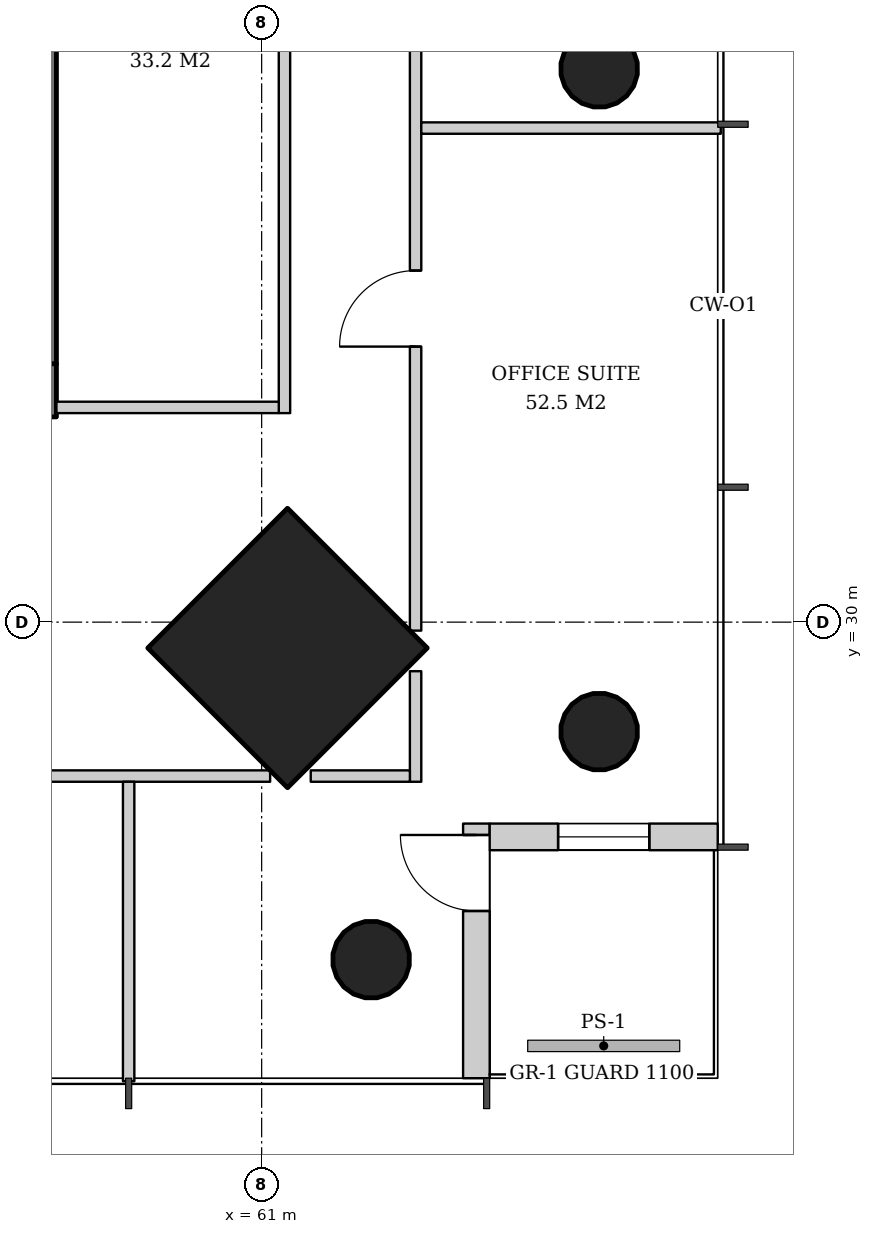
"""IFC4 building model, lengths in metres.
Left out: names, types, materials, properties, quantities, classifications, styles, units other than length and angle.
Written with IfcOpenShell. Run it as: python <this file> out.ifc"""

import sys

from ifc_helpers import new_model, si_unit, direction, frame, frame_2d, origin, origin_2d, place, context, subcontext, project, spatial, rectangle, hollow_circle, extrude, element, fill, save


model = new_model("IFC4")
c1 = context("Model", 3, precision=1e-05, world=origin(), true_north=direction((0.0, 1.0)))
c2 = subcontext(c1, "Body", "Model", "MODEL_VIEW")
j1 = project(units=[si_unit("LENGTHUNIT", "METRE"), si_unit("PLANEANGLEUNIT", "RADIAN")], contexts=[c1])
p1 = place(None, origin())
s1 = spatial("IfcSite", under=j1, at=p1, CompositionType="ELEMENT")
p2 = place(p1, origin())
s2 = spatial("IfcBuilding", under=s1, at=p2, CompositionType="ELEMENT")
p3 = place(p2, frame((0.0, 0.0, 131.2)))
s3 = spatial("IfcBuildingStorey", under=s2, at=p3, CompositionType="ELEMENT", Elevation=131.2)
p4 = place(p3, frame((65.479, 28.521, 0.0), z_axis=(-0.031898107953, 0.031898107953, 0.998981992539), x_axis=(-0.707106781187, -0.707106781187, 0.0)))
e1 = element("IfcColumn", 1, at=p4, inside=s3, PredefinedType="COLUMN", context=c2, shape_type="SweptSolid", body=[
    extrude(hollow_circle(Radius=0.508, WallThickness=0.04, at=origin_2d()), origin(), (0.0, 0.0, 1.0), 3.804),
])
p5 = place(p3, frame((65.479, 37.261, 0.0), z_axis=(-0.031910269556, 0.015987237665, 0.999362868496), x_axis=(-0.447933021895, -0.894067115991, 0.0)))
e2 = element("IfcColumn", 2, at=p5, inside=s3, PredefinedType="COLUMN", context=c2, shape_type="SweptSolid", body=[
    extrude(hollow_circle(Radius=0.508, WallThickness=0.04, at=origin_2d()), origin(), (0.0, 0.0, 1.0), 3.802),
])
p6 = place(p3, frame((61.379, 29.621, 0.0), z_axis=(-0.031962158256, 0.031962158256, 0.998977898093), x_axis=(-0.707106781187, -0.707106781187, 0.0)))
e3 = element("IfcColumn", 3, at=p6, inside=s3, PredefinedType="COLUMN", context=c2, shape_type="SweptSolid", body=[
    extrude(rectangle(XDim=2.6, YDim=2.6, at=origin_2d()), origin(), (0.0, 0.0, 1.0), 3.804),
])
p7 = place(p3, frame((62.479, 25.521, 0.0), z_axis=(-0.031898107953, 0.031898107953, 0.998981992539), x_axis=(-0.707106781187, -0.707106781187, 0.0)))
e4 = element("IfcColumn", 4, at=p7, inside=s3, PredefinedType="COLUMN", context=c2, shape_type="SweptSolid", body=[
    extrude(hollow_circle(Radius=0.508, WallThickness=0.04, at=origin_2d()), origin(), (0.0, 0.0, 1.0), 3.804),
])
p8 = place(p3, frame((31.7, 33.05, 0.0), z_axis=(0.0, 0.0, 1.0), x_axis=(1.0, 0.0, 0.0)))
e5 = element("IfcWall", 5, at=p8, inside=s3, PredefinedType="SHEAR", context=c2, shape_type="SweptSolid", body=[
    extrude(rectangle(XDim=26.6, YDim=0.7, at=frame_2d((13.3, 0.0))), origin(), (0.0, 0.0, 1.0), 3.8),
])
p9 = place(p8, frame((7.3, 0.0, 0.0)))
e6 = element("IfcOpeningElement", 6, at=p9, cuts=e5, PredefinedType="OPENING", context=c2, shape_type="SweptSolid", body=[
    extrude(rectangle(XDim=1.0, YDim=2.1, at=frame_2d((0.5, 1.05))), frame((0.0, 0.36, 0.0), z_axis=(0.0, -1.0, 0.0), x_axis=(1.0, 0.0, 0.0)), (0.0, 0.0, 1.0), 0.72),
])
p10 = place(p8, frame((18.75, 0.0, 0.0)))
e7 = element("IfcOpeningElement", 7, at=p10, cuts=e5, PredefinedType="OPENING", context=c2, shape_type="SweptSolid", body=[
    extrude(rectangle(XDim=1.0, YDim=2.1, at=frame_2d((0.5, 1.05))), frame((0.0, 0.36, 0.0), z_axis=(0.0, -1.0, 0.0), x_axis=(1.0, 0.0, 0.0)), (0.0, 0.0, 1.0), 0.72),
])
p11 = place(p8, frame((3.2, 0.0, 0.0)))
e8 = element("IfcOpeningElement", 8, at=p11, cuts=e5, PredefinedType="OPENING", context=c2, shape_type="SweptSolid", body=[
    extrude(rectangle(XDim=1.0, YDim=2.1, at=frame_2d((0.5, 1.05))), frame((0.0, 0.36, 0.0), z_axis=(0.0, -1.0, 0.0), x_axis=(1.0, 0.0, 0.0)), (0.0, 0.0, 1.0), 0.72),
])
p12 = place(p8, frame((10.42, 0.0, 0.0)))
e9 = element("IfcOpeningElement", 9, at=p12, cuts=e5, PredefinedType="OPENING", context=c2, shape_type="SweptSolid", body=[
    extrude(rectangle(XDim=1.0, YDim=2.1, at=frame_2d((0.5, 1.05))), frame((0.0, 0.36, 0.0), z_axis=(0.0, -1.0, 0.0), x_axis=(1.0, 0.0, 0.0)), (0.0, 0.0, 1.0), 0.72),
])
p13 = place(p8, frame((14.46, 0.0, 0.0)))
e10 = element("IfcOpeningElement", 10, at=p13, cuts=e5, PredefinedType="OPENING", context=c2, shape_type="SweptSolid", body=[
    extrude(rectangle(XDim=1.0, YDim=2.1, at=frame_2d((0.5, 1.05))), frame((0.0, 0.36, 0.0), z_axis=(0.0, -1.0, 0.0), x_axis=(1.0, 0.0, 0.0)), (0.0, 0.0, 1.0), 0.72),
])
p14 = place(p8, frame((22.5, 0.0, 0.0)))
e11 = element("IfcOpeningElement", 11, at=p14, cuts=e5, PredefinedType="OPENING", context=c2, shape_type="SweptSolid", body=[
    extrude(rectangle(XDim=1.0, YDim=2.1, at=frame_2d((0.5, 1.05))), frame((0.0, 0.36, 0.0), z_axis=(0.0, -1.0, 0.0), x_axis=(1.0, 0.0, 0.0)), (0.0, 0.0, 1.0), 0.72),
])
p15 = place(p3, frame((57.95, 33.4, 0.0), z_axis=(0.0, 0.0, 1.0), x_axis=(0.0, 1.0, 0.0)))
e12 = element("IfcWall", 12, at=p15, inside=s3, PredefinedType="SHEAR", context=c2, shape_type="SweptSolid", body=[
    extrude(rectangle(XDim=25.2, YDim=0.7, at=frame_2d((12.6, 0.0))), origin(), (0.0, 0.0, 1.0), 3.8),
])
p16 = place(p15, frame((11.7, 0.0, 0.0)))
e13 = element("IfcOpeningElement", 13, at=p16, cuts=e12, PredefinedType="OPENING", context=c2, shape_type="SweptSolid", body=[
    extrude(rectangle(XDim=1.8, YDim=2.4, at=frame_2d((0.9, 1.2))), frame((0.0, 0.36, 0.0), z_axis=(0.0, -1.0, 0.0), x_axis=(1.0, 0.0, 0.0)), (0.0, 0.0, 1.0), 0.72),
])
p17 = place(p3, frame((63.825, 24.0, 0.0), z_axis=(0.0, 0.0, 1.0), x_axis=(0.0, 1.0, 0.0)))
e14 = element("IfcWall", 14, at=p17, inside=s3, PredefinedType="SOLIDWALL", context=c2, shape_type="SweptSolid", body=[
    extrude(rectangle(XDim=3.35, YDim=0.35, at=frame_2d((1.675, 0.0))), origin(), (0.0, 0.0, 1.0), 3.62),
])
p18 = place(p17, frame((2.2, 0.0, 0.0)))
e15 = element("IfcOpeningElement", 15, at=p18, cuts=e14, PredefinedType="OPENING", context=c2, shape_type="SweptSolid", body=[
    extrude(rectangle(XDim=1.0, YDim=2.4, at=frame_2d((0.5, 1.2))), frame((0.0, 0.185, 0.0), z_axis=(0.0, -1.0, 0.0), x_axis=(1.0, 0.0, 0.0)), (0.0, 0.0, 1.0), 0.37),
])
p19 = place(p3, frame((64.0, 27.175, 0.0), z_axis=(0.0, 0.0, 1.0), x_axis=(1.0, 0.0, 0.0)))
e16 = element("IfcWall", 16, at=p19, inside=s3, PredefinedType="SOLIDWALL", context=c2, shape_type="SweptSolid", body=[
    extrude(rectangle(XDim=3.0, YDim=0.35, at=frame_2d((1.5, 0.0))), origin(), (0.0, 0.0, 1.0), 3.62),
])
p20 = place(p19, frame((0.9, 0.0, 0.6)))
e17 = element("IfcOpeningElement", 17, at=p20, cuts=e16, PredefinedType="OPENING", context=c2, shape_type="SweptSolid", body=[
    extrude(rectangle(XDim=1.2, YDim=2.55, at=frame_2d((0.6, 1.275))), frame((0.0, 0.185, 0.0), z_axis=(0.0, -1.0, 0.0), x_axis=(1.0, 0.0, 0.0)), (0.0, 0.0, 1.0), 0.37),
])
p21 = place(p3, frame((61.3, 32.75, 0.0), z_axis=(0.0, 0.0, 1.0), x_axis=(0.0, 1.0, 0.0)))
e18 = element("IfcWall", 18, at=p21, inside=s3, PredefinedType="PARTITIONING", context=c2, shape_type="SweptSolid", body=[
    extrude(rectangle(XDim=11.225, YDim=0.15, at=frame_2d((5.613, 0.0))), origin(), (0.0, 0.0, 1.0), 2.72),
])
p22 = place(p21, frame((5.113, 0.0, 0.0)))
e19 = element("IfcOpeningElement", 19, at=p22, cuts=e18, PredefinedType="OPENING", context=c2, shape_type="SweptSolid", body=[
    extrude(rectangle(XDim=1.0, YDim=2.1, at=frame_2d((0.5, 1.05))), frame((0.0, 0.085, 0.0), z_axis=(0.0, -1.0, 0.0), x_axis=(1.0, 0.0, 0.0)), (0.0, 0.0, 1.0), 0.17),
])
p23 = place(p3, frame((58.3, 32.825, 0.0), z_axis=(0.0, 0.0, 1.0), x_axis=(1.0, 0.0, 0.0)))
e20 = element("IfcWall", 20, at=p23, inside=s3, PredefinedType="PARTITIONING", context=c2, shape_type="SweptSolid", body=[
    extrude(rectangle(XDim=2.925, YDim=0.15, at=frame_2d((1.462, 0.0))), origin(), (0.0, 0.0, 1.0), 2.72),
])
p24 = place(p3, frame((63.025, 27.9, 0.0), z_axis=(0.0, 0.0, 1.0), x_axis=(0.0, 1.0, 0.0)))
e21 = element("IfcWall", 21, at=p24, inside=s3, PredefinedType="PARTITIONING", context=c2, shape_type="SweptSolid", body=[
    extrude(rectangle(XDim=1.455, YDim=0.15, at=frame_2d((0.727, 0.0))), origin(), (0.0, 0.0, 1.0), 3.07),
])
p25 = place(p3, frame((63.025, 29.888, 0.0), z_axis=(0.0, 0.0, 1.0), x_axis=(0.0, 1.0, 0.0)))
e22 = element("IfcWall", 22, at=p25, inside=s3, PredefinedType="PARTITIONING", context=c2, shape_type="SweptSolid", body=[
    extrude(rectangle(XDim=32.223, YDim=0.15, at=frame_2d((16.112, 0.0))), origin(), (0.0, 0.0, 1.0), 2.72),
])
p26 = place(p25, frame((3.737, 0.0, 0.0)))
e23 = element("IfcOpeningElement", 23, at=p26, cuts=e22, PredefinedType="OPENING", context=c2, shape_type="SweptSolid", body=[
    extrude(rectangle(XDim=1.0, YDim=2.1, at=frame_2d((0.5, 1.05))), frame((0.0, 0.085, 0.0), z_axis=(0.0, -1.0, 0.0), x_axis=(1.0, 0.0, 0.0)), (0.0, 0.0, 1.0), 0.17),
])
p27 = place(p25, frame((8.487, 0.0, 0.0)))
e24 = element("IfcOpeningElement", 24, at=p27, cuts=e22, PredefinedType="OPENING", context=c2, shape_type="SweptSolid", body=[
    extrude(rectangle(XDim=1.0, YDim=2.1, at=frame_2d((0.5, 1.05))), frame((0.0, 0.085, 0.0), z_axis=(0.0, -1.0, 0.0), x_axis=(1.0, 0.0, 0.0)), (0.0, 0.0, 1.0), 0.17),
])
p28 = place(p25, frame((14.937, 0.0, 0.0)))
e25 = element("IfcOpeningElement", 25, at=p28, cuts=e22, PredefinedType="OPENING", context=c2, shape_type="SweptSolid", body=[
    extrude(rectangle(XDim=1.8, YDim=2.4, at=frame_2d((0.9, 1.2))), frame((0.0, 0.085, 0.0), z_axis=(0.0, -1.0, 0.0), x_axis=(1.0, 0.0, 0.0)), (0.0, 0.0, 1.0), 0.17),
])
p29 = place(p25, frame((20.437, 0.0, 0.0)))
e26 = element("IfcOpeningElement", 26, at=p29, cuts=e22, PredefinedType="OPENING", context=c2, shape_type="SweptSolid", body=[
    extrude(rectangle(XDim=1.0, YDim=2.1, at=frame_2d((0.5, 1.05))), frame((0.0, 0.085, 0.0), z_axis=(0.0, -1.0, 0.0), x_axis=(1.0, 0.0, 0.0)), (0.0, 0.0, 1.0), 0.17),
])
p30 = place(p25, frame((27.487, 0.0, 0.0)))
e27 = element("IfcOpeningElement", 27, at=p30, cuts=e22, PredefinedType="OPENING", context=c2, shape_type="SweptSolid", body=[
    extrude(rectangle(XDim=1.0, YDim=2.1, at=frame_2d((0.5, 1.05))), frame((0.0, 0.085, 0.0), z_axis=(0.0, -1.0, 0.0), x_axis=(1.0, 0.0, 0.0)), (0.0, 0.0, 1.0), 0.17),
])
p31 = place(p3, frame((63.1, 36.5, 0.0), z_axis=(0.0, 0.0, 1.0), x_axis=(1.0, 0.0, 0.0)))
e28 = element("IfcWall", 28, at=p31, inside=s3, PredefinedType="PARTITIONING", context=c2, shape_type="SweptSolid", body=[
    extrude(rectangle(XDim=3.94, YDim=0.15, at=frame_2d((1.97, 0.0))), origin(), (0.0, 0.0, 1.0), 2.82),
])
p32 = place(p3, frame((28.888, 27.975, 0.0), z_axis=(0.0, 0.0, 1.0), x_axis=(1.0, 0.0, 0.0)))
e29 = element("IfcWall", 29, at=p32, inside=s3, PredefinedType="PARTITIONING", context=c2, shape_type="SweptSolid", body=[
    extrude(rectangle(XDim=32.223, YDim=0.15, at=frame_2d((16.112, 0.0))), origin(), (0.0, 0.0, 1.0), 2.72),
])
p33 = place(p32, frame((3.336, 0.0, 0.0)))
e30 = element("IfcOpeningElement", 30, at=p33, cuts=e29, PredefinedType="OPENING", context=c2, shape_type="SweptSolid", body=[
    extrude(rectangle(XDim=1.8, YDim=2.4, at=frame_2d((0.9, 1.2))), frame((0.0, 0.085, 0.0), z_axis=(0.0, -1.0, 0.0), x_axis=(1.0, 0.0, 0.0)), (0.0, 0.0, 1.0), 0.17),
])
p34 = place(p32, frame((8.086, 0.0, 0.0)))
e31 = element("IfcOpeningElement", 31, at=p34, cuts=e29, PredefinedType="OPENING", context=c2, shape_type="SweptSolid", body=[
    extrude(rectangle(XDim=1.8, YDim=2.4, at=frame_2d((0.9, 1.2))), frame((0.0, 0.085, 0.0), z_axis=(0.0, -1.0, 0.0), x_axis=(1.0, 0.0, 0.0)), (0.0, 0.0, 1.0), 0.17),
])
p35 = place(p3, frame((61.646, 27.975, 0.0), z_axis=(0.0, 0.0, 1.0), x_axis=(1.0, 0.0, 0.0)))
e32 = element("IfcWall", 32, at=p35, inside=s3, PredefinedType="PARTITIONING", context=c2, shape_type="SweptSolid", body=[
    extrude(rectangle(XDim=1.304, YDim=0.15, at=frame_2d((0.652, 0.0))), origin(), (0.0, 0.0, 1.0), 3.07),
])
p36 = place(p3, frame((59.25, 27.9, 0.0), z_axis=(0.0, 0.0, 1.0), x_axis=(0.0, -1.0, 0.0)))
e33 = element("IfcWall", 33, at=p36, inside=s3, PredefinedType="PARTITIONING", context=c2, shape_type="SweptSolid", body=[
    extrude(rectangle(XDim=3.94, YDim=0.15, at=frame_2d((1.97, 0.0))), origin(), (0.0, 0.0, 1.0), 2.82),
])
p37 = place(p18, origin())
e34 = element("IfcDoor", 34, at=p37, inside=s3, OperationType="SINGLE_SWING_RIGHT", PredefinedType="DOOR", context=c2, shape_type="SweptSolid", body=[
    extrude(rectangle(XDim=1.0, YDim=2.4, at=frame_2d((0.5, 1.2))), frame((0.0, 0.025, 0.0), z_axis=(0.0, -1.0, 0.0), x_axis=(1.0, 0.0, 0.0)), (0.0, 0.0, 1.0), 0.05),
])
fill(e15, e34)
p38 = place(p20, origin())
e35 = element("IfcWindow", 35, at=p38, inside=s3, PartitioningType="SINGLE_PANEL", PredefinedType="WINDOW", context=c2, shape_type="SweptSolid", body=[
    extrude(rectangle(XDim=1.2, YDim=2.55, at=frame_2d((0.6, 1.275))), frame((0.0, 0.03, 0.0), z_axis=(0.0, -1.0, 0.0), x_axis=(1.0, 0.0, 0.0)), (0.0, 0.0, 1.0), 0.06),
])
fill(e17, e35)
p39 = place(p26, origin())
e36 = element("IfcDoor", 36, at=p39, inside=s3, OperationType="SINGLE_SWING_LEFT", PredefinedType="DOOR", context=c2, shape_type="SweptSolid", body=[
    extrude(rectangle(XDim=1.0, YDim=2.1, at=frame_2d((0.5, 1.05))), frame((0.0, 0.025, 0.0), z_axis=(0.0, -1.0, 0.0), x_axis=(1.0, 0.0, 0.0)), (0.0, 0.0, 1.0), 0.05),
])
fill(e23, e36)
save(model, sys.argv[1])
